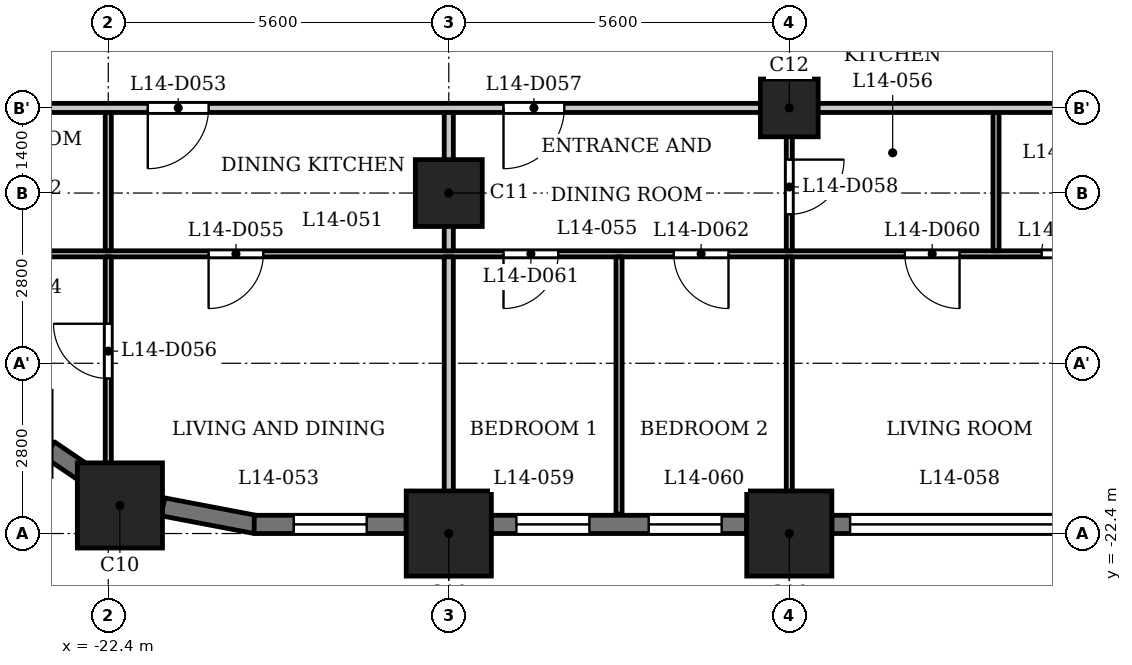
"""IFC4 building model, lengths in metres.
Left out: names, types, materials, properties, quantities, classifications, styles, units other than length and angle.
Written with IfcOpenShell. Run it as: python <this file> out.ifc"""

import sys

from ifc_helpers import new_model, si_unit, direction, frame, frame_2d, origin, origin_2d, place, context, subcontext, project, spatial, rectangle, extrude, element, fill, save


model = new_model("IFC4")
c1 = context("Model", 3, precision=1e-05, world=origin(), true_north=direction((0.0, 1.0)))
c2 = subcontext(c1, "Body", "Model", "MODEL_VIEW")
j1 = project(units=[si_unit("LENGTHUNIT", "METRE"), si_unit("PLANEANGLEUNIT", "RADIAN")], contexts=[c1])
p1 = place(None, origin())
s1 = spatial("IfcSite", under=j1, at=p1, CompositionType="ELEMENT")
p2 = place(p1, origin())
s2 = spatial("IfcBuilding", under=s1, at=p2, CompositionType="ELEMENT")
p3 = place(p2, frame((0.0, 0.0, 58.5)))
s3 = spatial("IfcBuildingStorey", under=s2, at=p3, CompositionType="ELEMENT", Elevation=58.5)
for number, where, z_axis, x_axis in (
    (1, (-22.209, -21.938, 0.0), (0.0, 0.0, 1.0), (1.0, 0.0, 0.0)),
    (2, (-16.8, -22.4, 0.0), (0.0, 0.0, 1.0), (1.0, 0.0, 0.0)),
    (3, (-11.2, -22.4, 0.0), (0.0, 0.0, 1.0), (1.0, 0.0, 0.0)),
):
    element("IfcColumn", number, at=place(p3, frame(where, z_axis=z_axis, x_axis=x_axis)), inside=s3, PredefinedType="COLUMN", context=c2, shape_type="SweptSolid", body=[
        extrude(rectangle(XDim=1.4, YDim=1.4, at=origin_2d()), origin(), (0.0, 0.0, 1.0), 3.5),
    ])
p4 = place(p3, frame((-16.8, -16.8, 0.0), z_axis=(0.0, 0.0, 1.0), x_axis=(1.0, 0.0, 0.0)))
e4 = element("IfcColumn", 4, at=p4, inside=s3, PredefinedType="COLUMN", context=c2, shape_type="SweptSolid", body=[
    extrude(rectangle(XDim=1.1, YDim=1.1, at=origin_2d()), origin(), (0.0, 0.0, 1.0), 3.5),
])
p5 = place(p3, frame((-11.2, -15.4, 0.0), z_axis=(0.0, 0.0, 1.0), x_axis=(1.0, 0.0, 0.0)))
e5 = element("IfcColumn", 5, at=p5, inside=s3, PredefinedType="COLUMN", context=c2, shape_type="SweptSolid", body=[
    extrude(rectangle(XDim=0.95, YDim=0.95, at=origin_2d()), origin(), (0.0, 0.0, 1.0), 3.5),
])
p6 = place(p3, frame((-23.368, -21.017, 0.0), z_axis=(0.0, 0.0, 1.0), x_axis=(0.827037530089, -0.562146710232, 0.0)))
e6 = element("IfcWall", 6, at=p6, inside=s3, PredefinedType="SOLIDWALL", context=c2, shape_type="SweptSolid", body=[
    extrude(rectangle(XDim=0.777, YDim=0.3, at=frame_2d((0.388, 0.0))), origin(), (0.0, 0.0, 1.0), 3.2),
])
p7 = place(p3, frame((-21.5, -21.961, 0.0), z_axis=(0.0, 0.0, 1.0), x_axis=(0.982297345734, -0.187328386968, 0.0)))
e7 = element("IfcWall", 7, at=p7, inside=s3, PredefinedType="SOLIDWALL", context=c2, shape_type="SweptSolid", body=[
    extrude(rectangle(XDim=1.556, YDim=0.3, at=frame_2d((0.778, 0.0))), origin(), (0.0, 0.0, 1.0), 2.35),
])
p8 = place(p3, frame((-20.0, -22.25, 0.0), z_axis=(0.0, 0.0, 1.0), x_axis=(1.0, 0.0, 0.0)))
e8 = element("IfcWall", 8, at=p8, inside=s3, PredefinedType="SOLIDWALL", context=c2, shape_type="SweptSolid", body=[
    extrude(rectangle(XDim=2.5, YDim=0.3, at=frame_2d((1.25, 0.0))), origin(), (0.0, 0.0, 1.0), 2.35),
])
p9 = place(p8, frame((0.65, 0.0, 0.6)))
e9 = element("IfcOpeningElement", 9, at=p9, cuts=e8, PredefinedType="OPENING", context=c2, shape_type="SweptSolid", body=[
    extrude(rectangle(XDim=1.2, YDim=1.55, at=frame_2d((0.6, 0.775))), frame((0.0, 0.16, 0.0), z_axis=(0.0, -1.0, 0.0), x_axis=(1.0, 0.0, 0.0)), (0.0, 0.0, 1.0), 0.32),
])
p10 = place(p3, frame((-16.1, -22.25, 0.0), z_axis=(0.0, 0.0, 1.0), x_axis=(1.0, 0.0, 0.0)))
e10 = element("IfcWall", 10, at=p10, inside=s3, PredefinedType="SOLIDWALL", context=c2, shape_type="SweptSolid", body=[
    extrude(rectangle(XDim=4.2, YDim=0.3, at=frame_2d((2.1, 0.0))), origin(), (0.0, 0.0, 1.0), 2.35),
])
p11 = place(p10, frame((0.413, 0.0, 0.6)))
e11 = element("IfcOpeningElement", 11, at=p11, cuts=e10, PredefinedType="OPENING", context=c2, shape_type="SweptSolid", body=[
    extrude(rectangle(XDim=1.2, YDim=1.55, at=frame_2d((0.6, 0.775))), frame((0.0, 0.16, 0.0), z_axis=(0.0, -1.0, 0.0), x_axis=(1.0, 0.0, 0.0)), (0.0, 0.0, 1.0), 0.32),
])
p12 = place(p10, frame((2.587, 0.0, 0.6)))
e12 = element("IfcOpeningElement", 12, at=p12, cuts=e10, PredefinedType="OPENING", context=c2, shape_type="SweptSolid", body=[
    extrude(rectangle(XDim=1.2, YDim=1.55, at=frame_2d((0.6, 0.775))), frame((0.0, 0.16, 0.0), z_axis=(0.0, -1.0, 0.0), x_axis=(1.0, 0.0, 0.0)), (0.0, 0.0, 1.0), 0.32),
])
p13 = place(p3, frame((-10.5, -22.25, 0.0), z_axis=(0.0, 0.0, 1.0), x_axis=(1.0, 0.0, 0.0)))
e13 = element("IfcWall", 13, at=p13, inside=s3, PredefinedType="SOLIDWALL", context=c2, shape_type="SweptSolid", body=[
    extrude(rectangle(XDim=4.2, YDim=0.3, at=frame_2d((2.1, 0.0))), origin(), (0.0, 0.0, 1.0), 2.35),
])
p14 = place(p13, frame((0.3, 0.0, 1.2)))
e14 = element("IfcOpeningElement", 14, at=p14, cuts=e13, PredefinedType="OPENING", context=c2, shape_type="SweptSolid", body=[
    extrude(rectangle(XDim=3.6, YDim=0.95, at=frame_2d((1.8, 0.475))), frame((0.0, 0.16, 0.0), z_axis=(0.0, -1.0, 0.0), x_axis=(1.0, 0.0, 0.0)), (0.0, 0.0, 1.0), 0.32),
])
p15 = place(p3, frame((-26.394, -17.8, 0.0), z_axis=(0.0, 0.0, 1.0), x_axis=(1.0, 0.0, 0.0)))
e15 = element("IfcWall", 15, at=p15, inside=s3, PredefinedType="PARTITIONING", context=c2, shape_type="SweptSolid", body=[
    extrude(rectangle(XDim=53.034, YDim=0.1, at=frame_2d((26.517, 0.0))), origin(), (0.0, 0.0, 1.0), 3.2),
])
p16 = place(p15, frame((0.794, 0.0, 0.0)))
e16 = element("IfcOpeningElement", 16, at=p16, cuts=e15, PredefinedType="OPENING", context=c2, shape_type="SweptSolid", body=[
    extrude(rectangle(XDim=0.8, YDim=2.1, at=frame_2d((0.4, 1.05))), frame((0.0, 0.06, 0.0), z_axis=(0.0, -1.0, 0.0), x_axis=(1.0, 0.0, 0.0)), (0.0, 0.0, 1.0), 0.12),
])
p17 = place(p15, frame((5.644, 0.0, 0.0)))
e17 = element("IfcOpeningElement", 17, at=p17, cuts=e15, PredefinedType="OPENING", context=c2, shape_type="SweptSolid", body=[
    extrude(rectangle(XDim=0.9, YDim=2.1, at=frame_2d((0.45, 1.05))), frame((0.0, 0.06, 0.0), z_axis=(0.0, -1.0, 0.0), x_axis=(1.0, 0.0, 0.0)), (0.0, 0.0, 1.0), 0.12),
])
p18 = place(p15, frame((19.344, 0.0, 0.0)))
e18 = element("IfcOpeningElement", 18, at=p18, cuts=e15, PredefinedType="OPENING", context=c2, shape_type="SweptSolid", body=[
    extrude(rectangle(XDim=0.8, YDim=2.1, at=frame_2d((0.4, 1.05))), frame((0.0, 0.06, 0.0), z_axis=(0.0, -1.0, 0.0), x_axis=(1.0, 0.0, 0.0)), (0.0, 0.0, 1.0), 0.12),
])
p19 = place(p15, frame((17.094, 0.0, 0.0)))
e19 = element("IfcOpeningElement", 19, at=p19, cuts=e15, PredefinedType="OPENING", context=c2, shape_type="SweptSolid", body=[
    extrude(rectangle(XDim=0.9, YDim=2.1, at=frame_2d((0.45, 1.05))), frame((0.0, 0.06, 0.0), z_axis=(0.0, -1.0, 0.0), x_axis=(1.0, 0.0, 0.0)), (0.0, 0.0, 1.0), 0.12),
])
p20 = place(p15, frame((10.494, 0.0, 0.0)))
e20 = element("IfcOpeningElement", 20, at=p20, cuts=e15, PredefinedType="OPENING", context=c2, shape_type="SweptSolid", body=[
    extrude(rectangle(XDim=0.9, YDim=2.1, at=frame_2d((0.45, 1.05))), frame((0.0, 0.06, 0.0), z_axis=(0.0, -1.0, 0.0), x_axis=(1.0, 0.0, 0.0)), (0.0, 0.0, 1.0), 0.12),
])
p21 = place(p15, frame((13.294, 0.0, 0.0)))
e21 = element("IfcOpeningElement", 21, at=p21, cuts=e15, PredefinedType="OPENING", context=c2, shape_type="SweptSolid", body=[
    extrude(rectangle(XDim=0.9, YDim=2.1, at=frame_2d((0.45, 1.05))), frame((0.0, 0.06, 0.0), z_axis=(0.0, -1.0, 0.0), x_axis=(1.0, 0.0, 0.0)), (0.0, 0.0, 1.0), 0.12),
])
p22 = place(p15, frame((27.044, 0.0, 0.0)))
e22 = element("IfcOpeningElement", 22, at=p22, cuts=e15, PredefinedType="OPENING", context=c2, shape_type="SweptSolid", body=[
    extrude(rectangle(XDim=0.8, YDim=2.1, at=frame_2d((0.4, 1.05))), frame((0.0, 0.06, 0.0), z_axis=(0.0, -1.0, 0.0), x_axis=(1.0, 0.0, 0.0)), (0.0, 0.0, 1.0), 0.12),
])
p23 = place(p15, frame((22.444, 0.0, 0.0)))
e23 = element("IfcOpeningElement", 23, at=p23, cuts=e15, PredefinedType="OPENING", context=c2, shape_type="SweptSolid", body=[
    extrude(rectangle(XDim=0.9, YDim=2.1, at=frame_2d((0.45, 1.05))), frame((0.0, 0.06, 0.0), z_axis=(0.0, -1.0, 0.0), x_axis=(1.0, 0.0, 0.0)), (0.0, 0.0, 1.0), 0.12),
])
p24 = place(p15, frame((36.144, 0.0, 0.0)))
e24 = element("IfcOpeningElement", 24, at=p24, cuts=e15, PredefinedType="OPENING", context=c2, shape_type="SweptSolid", body=[
    extrude(rectangle(XDim=0.8, YDim=2.1, at=frame_2d((0.4, 1.05))), frame((0.0, 0.06, 0.0), z_axis=(0.0, -1.0, 0.0), x_axis=(1.0, 0.0, 0.0)), (0.0, 0.0, 1.0), 0.12),
])
p25 = place(p15, frame((33.644, 0.0, 0.0)))
e25 = element("IfcOpeningElement", 25, at=p25, cuts=e15, PredefinedType="OPENING", context=c2, shape_type="SweptSolid", body=[
    extrude(rectangle(XDim=0.9, YDim=2.1, at=frame_2d((0.45, 1.05))), frame((0.0, 0.06, 0.0), z_axis=(0.0, -1.0, 0.0), x_axis=(1.0, 0.0, 0.0)), (0.0, 0.0, 1.0), 0.12),
])
p26 = place(p15, frame((39.144, 0.0, 0.0)))
e26 = element("IfcOpeningElement", 26, at=p26, cuts=e15, PredefinedType="OPENING", context=c2, shape_type="SweptSolid", body=[
    extrude(rectangle(XDim=0.8, YDim=2.1, at=frame_2d((0.4, 1.05))), frame((0.0, 0.06, 0.0), z_axis=(0.0, -1.0, 0.0), x_axis=(1.0, 0.0, 0.0)), (0.0, 0.0, 1.0), 0.12),
])
p27 = place(p15, frame((41.494, 0.0, 0.0)))
e27 = element("IfcOpeningElement", 27, at=p27, cuts=e15, PredefinedType="OPENING", context=c2, shape_type="SweptSolid", body=[
    extrude(rectangle(XDim=0.9, YDim=2.1, at=frame_2d((0.45, 1.05))), frame((0.0, 0.06, 0.0), z_axis=(0.0, -1.0, 0.0), x_axis=(1.0, 0.0, 0.0)), (0.0, 0.0, 1.0), 0.12),
])
p28 = place(p15, frame((49.362, 0.0, 0.0)))
e28 = element("IfcOpeningElement", 28, at=p28, cuts=e15, PredefinedType="OPENING", context=c2, shape_type="SweptSolid", body=[
    extrude(rectangle(XDim=0.8, YDim=2.1, at=frame_2d((0.4, 1.05))), frame((0.0, 0.06, 0.0), z_axis=(0.0, -1.0, 0.0), x_axis=(1.0, 0.0, 0.0)), (0.0, 0.0, 1.0), 0.12),
])
p29 = place(p15, frame((45.094, 0.0, 0.0)))
e29 = element("IfcOpeningElement", 29, at=p29, cuts=e15, PredefinedType="OPENING", context=c2, shape_type="SweptSolid", body=[
    extrude(rectangle(XDim=0.9, YDim=2.1, at=frame_2d((0.45, 1.05))), frame((0.0, 0.06, 0.0), z_axis=(0.0, -1.0, 0.0), x_axis=(1.0, 0.0, 0.0)), (0.0, 0.0, 1.0), 0.12),
])
p30 = place(p3, frame((-27.484, -15.4, 0.0), z_axis=(0.0, 0.0, 1.0), x_axis=(1.0, 0.0, 0.0)))
e30 = element("IfcWall", 30, at=p30, inside=s3, PredefinedType="PARTITIONING", context=c2, shape_type="SweptSolid", body=[
    extrude(rectangle(XDim=54.968, YDim=0.15, at=frame_2d((27.484, 0.0))), origin(), (0.0, 0.0, 1.0), 3.2),
])
p31 = place(p30, frame((5.734, 0.0, 0.0)))
e31 = element("IfcOpeningElement", 31, at=p31, cuts=e30, PredefinedType="OPENING", context=c2, shape_type="SweptSolid", body=[
    extrude(rectangle(XDim=1.0, YDim=2.1, at=frame_2d((0.5, 1.05))), frame((0.0, 0.085, 0.0), z_axis=(0.0, -1.0, 0.0), x_axis=(1.0, 0.0, 0.0)), (0.0, 0.0, 1.0), 0.17),
])
p32 = place(p30, frame((11.584, 0.0, 0.0)))
e32 = element("IfcOpeningElement", 32, at=p32, cuts=e30, PredefinedType="OPENING", context=c2, shape_type="SweptSolid", body=[
    extrude(rectangle(XDim=1.0, YDim=2.1, at=frame_2d((0.5, 1.05))), frame((0.0, 0.085, 0.0), z_axis=(0.0, -1.0, 0.0), x_axis=(1.0, 0.0, 0.0)), (0.0, 0.0, 1.0), 0.17),
])
p33 = place(p30, frame((22.534, 0.0, 0.0)))
e33 = element("IfcOpeningElement", 33, at=p33, cuts=e30, PredefinedType="OPENING", context=c2, shape_type="SweptSolid", body=[
    extrude(rectangle(XDim=1.0, YDim=2.1, at=frame_2d((0.5, 1.05))), frame((0.0, 0.085, 0.0), z_axis=(0.0, -1.0, 0.0), x_axis=(1.0, 0.0, 0.0)), (0.0, 0.0, 1.0), 0.17),
])
p34 = place(p30, frame((33.734, 0.0, 0.0)))
e34 = element("IfcOpeningElement", 34, at=p34, cuts=e30, PredefinedType="OPENING", context=c2, shape_type="SweptSolid", body=[
    extrude(rectangle(XDim=1.0, YDim=2.1, at=frame_2d((0.5, 1.05))), frame((0.0, 0.085, 0.0), z_axis=(0.0, -1.0, 0.0), x_axis=(1.0, 0.0, 0.0)), (0.0, 0.0, 1.0), 0.17),
])
p35 = place(p30, frame((42.334, 0.0, 0.0)))
e35 = element("IfcOpeningElement", 35, at=p35, cuts=e30, PredefinedType="OPENING", context=c2, shape_type="SweptSolid", body=[
    extrude(rectangle(XDim=1.0, YDim=2.1, at=frame_2d((0.5, 1.05))), frame((0.0, 0.085, 0.0), z_axis=(0.0, -1.0, 0.0), x_axis=(1.0, 0.0, 0.0)), (0.0, 0.0, 1.0), 0.17),
])
p36 = place(p30, frame((45.184, 0.0, 0.0)))
e36 = element("IfcOpeningElement", 36, at=p36, cuts=e30, PredefinedType="OPENING", context=c2, shape_type="SweptSolid", body=[
    extrude(rectangle(XDim=1.0, YDim=2.1, at=frame_2d((0.5, 1.05))), frame((0.0, 0.085, 0.0), z_axis=(0.0, -1.0, 0.0), x_axis=(1.0, 0.0, 0.0)), (0.0, 0.0, 1.0), 0.17),
])
p37 = place(p3, frame((-22.4, -21.72, 0.0), z_axis=(0.0, 0.0, 1.0), x_axis=(0.0, 1.0, 0.0)))
e37 = element("IfcWall", 37, at=p37, inside=s3, PredefinedType="PARTITIONING", context=c2, shape_type="SweptSolid", body=[
    extrude(rectangle(XDim=3.87, YDim=0.1, at=frame_2d((1.935, 0.0))), origin(), (0.0, 0.0, 1.0), 3.2),
])
p38 = place(p37, frame((1.87, 0.0, 0.0)))
e38 = element("IfcOpeningElement", 38, at=p38, cuts=e37, PredefinedType="OPENING", context=c2, shape_type="SweptSolid", body=[
    extrude(rectangle(XDim=0.9, YDim=2.1, at=frame_2d((0.45, 1.05))), frame((0.0, 0.06, 0.0), z_axis=(0.0, -1.0, 0.0), x_axis=(1.0, 0.0, 0.0)), (0.0, 0.0, 1.0), 0.12),
])
p39 = place(p3, frame((-22.4, -17.75, 0.0), z_axis=(0.0, 0.0, 1.0), x_axis=(0.0, 1.0, 0.0)))
e39 = element("IfcWall", 39, at=p39, inside=s3, PredefinedType="PARTITIONING", context=c2, shape_type="SweptSolid", body=[
    extrude(rectangle(XDim=2.275, YDim=0.1, at=frame_2d((1.137, 0.0))), origin(), (0.0, 0.0, 1.0), 3.2),
])
p40 = place(p3, frame((-16.8, -23.08, 0.0), z_axis=(0.0, 0.0, 1.0), x_axis=(0.0, 1.0, 0.0)))
e40 = element("IfcWall", 40, at=p40, inside=s3, PredefinedType="PARTITIONING", context=c2, shape_type="SweptSolid", body=[
    extrude(rectangle(XDim=5.23, YDim=0.15, at=frame_2d((2.615, 0.0))), origin(), (0.0, 0.0, 1.0), 3.2),
])
p41 = place(p3, frame((-16.8, -17.75, 0.0), z_axis=(0.0, 0.0, 1.0), x_axis=(0.0, 1.0, 0.0)))
e41 = element("IfcWall", 41, at=p41, inside=s3, PredefinedType="PARTITIONING", context=c2, shape_type="SweptSolid", body=[
    extrude(rectangle(XDim=2.275, YDim=0.15, at=frame_2d((1.137, 0.0))), origin(), (0.0, 0.0, 1.0), 3.2),
])
p42 = place(p3, frame((-14.0, -22.08, 0.0), z_axis=(0.0, 0.0, 1.0), x_axis=(0.0, 1.0, 0.0)))
e42 = element("IfcWall", 42, at=p42, inside=s3, PredefinedType="PARTITIONING", context=c2, shape_type="SweptSolid", body=[
    extrude(rectangle(XDim=4.23, YDim=0.1, at=frame_2d((2.115, 0.0))), origin(), (0.0, 0.0, 1.0), 3.2),
])
p43 = place(p3, frame((-11.2, -23.08, 0.0), z_axis=(0.0, 0.0, 1.0), x_axis=(0.0, 1.0, 0.0)))
e43 = element("IfcWall", 43, at=p43, inside=s3, PredefinedType="PARTITIONING", context=c2, shape_type="SweptSolid", body=[
    extrude(rectangle(XDim=5.23, YDim=0.1, at=frame_2d((2.615, 0.0))), origin(), (0.0, 0.0, 1.0), 3.2),
])
p44 = place(p3, frame((-11.2, -17.75, 0.0), z_axis=(0.0, 0.0, 1.0), x_axis=(0.0, 1.0, 0.0)))
e44 = element("IfcWall", 44, at=p44, inside=s3, PredefinedType="PARTITIONING", context=c2, shape_type="SweptSolid", body=[
    extrude(rectangle(XDim=2.275, YDim=0.1, at=frame_2d((1.137, 0.0))), origin(), (0.0, 0.0, 1.0), 3.2),
])
p45 = place(p44, frame((0.6, 0.0, 0.0)))
e45 = element("IfcOpeningElement", 45, at=p45, cuts=e44, PredefinedType="OPENING", context=c2, shape_type="SweptSolid", body=[
    extrude(rectangle(XDim=0.9, YDim=2.1, at=frame_2d((0.45, 1.05))), frame((0.0, 0.06, 0.0), z_axis=(0.0, -1.0, 0.0), x_axis=(1.0, 0.0, 0.0)), (0.0, 0.0, 1.0), 0.12),
])
p46 = place(p3, frame((-7.8, -17.75, 0.0), z_axis=(0.0, 0.0, 1.0), x_axis=(0.0, 1.0, 0.0)))
e46 = element("IfcWall", 46, at=p46, inside=s3, PredefinedType="PARTITIONING", context=c2, shape_type="SweptSolid", body=[
    extrude(rectangle(XDim=2.275, YDim=0.1, at=frame_2d((1.137, 0.0))), origin(), (0.0, 0.0, 1.0), 3.2),
])
p47 = place(p31, origin())
e47 = element("IfcDoor", 47, at=p47, inside=s3, OperationType="SINGLE_SWING_LEFT", PredefinedType="DOOR", context=c2, shape_type="SweptSolid", body=[
    extrude(rectangle(XDim=1.0, YDim=2.1, at=frame_2d((0.5, 1.05))), frame((0.0, 0.025, 0.0), z_axis=(0.0, -1.0, 0.0), x_axis=(1.0, 0.0, 0.0)), (0.0, 0.0, 1.0), 0.05),
])
fill(e31, e47)
p48 = place(p17, origin())
e48 = element("IfcDoor", 48, at=p48, inside=s3, OperationType="SINGLE_SWING_LEFT", PredefinedType="DOOR", context=c2, shape_type="SweptSolid", body=[
    extrude(rectangle(XDim=0.9, YDim=2.1, at=frame_2d((0.45, 1.05))), frame((0.0, 0.025, 0.0), z_axis=(0.0, -1.0, 0.0), x_axis=(1.0, 0.0, 0.0)), (0.0, 0.0, 1.0), 0.05),
])
fill(e17, e48)
p49 = place(p38, origin())
e49 = element("IfcDoor", 49, at=p49, inside=s3, OperationType="SINGLE_SWING_LEFT", PredefinedType="DOOR", context=c2, shape_type="SweptSolid", body=[
    extrude(rectangle(XDim=0.9, YDim=2.1, at=frame_2d((0.45, 1.05))), frame((0.0, 0.025, 0.0), z_axis=(0.0, -1.0, 0.0), x_axis=(1.0, 0.0, 0.0)), (0.0, 0.0, 1.0), 0.05),
])
fill(e38, e49)
p50 = place(p32, origin())
e50 = element("IfcDoor", 50, at=p50, inside=s3, OperationType="SINGLE_SWING_LEFT", PredefinedType="DOOR", context=c2, shape_type="SweptSolid", body=[
    extrude(rectangle(XDim=1.0, YDim=2.1, at=frame_2d((0.5, 1.05))), frame((0.0, 0.025, 0.0), z_axis=(0.0, -1.0, 0.0), x_axis=(1.0, 0.0, 0.0)), (0.0, 0.0, 1.0), 0.05),
])
fill(e32, e50)
p51 = place(p45, origin())
e51 = element("IfcDoor", 51, at=p51, inside=s3, OperationType="SINGLE_SWING_RIGHT", PredefinedType="DOOR", context=c2, shape_type="SweptSolid", body=[
    extrude(rectangle(XDim=0.9, YDim=2.1, at=frame_2d((0.45, 1.05))), frame((0.0, 0.025, 0.0), z_axis=(0.0, -1.0, 0.0), x_axis=(1.0, 0.0, 0.0)), (0.0, 0.0, 1.0), 0.05),
])
fill(e45, e51)
p52 = place(p18, origin())
e52 = element("IfcDoor", 52, at=p52, inside=s3, OperationType="SINGLE_SWING_LEFT", PredefinedType="DOOR", context=c2, shape_type="SweptSolid", body=[
    extrude(rectangle(XDim=0.8, YDim=2.1, at=frame_2d((0.4, 1.05))), frame((0.0, 0.025, 0.0), z_axis=(0.0, -1.0, 0.0), x_axis=(1.0, 0.0, 0.0)), (0.0, 0.0, 1.0), 0.05),
])
fill(e18, e52)
p53 = place(p19, origin())
e53 = element("IfcDoor", 53, at=p53, inside=s3, OperationType="SINGLE_SWING_RIGHT", PredefinedType="DOOR", context=c2, shape_type="SweptSolid", body=[
    extrude(rectangle(XDim=0.9, YDim=2.1, at=frame_2d((0.45, 1.05))), frame((0.0, 0.025, 0.0), z_axis=(0.0, -1.0, 0.0), x_axis=(1.0, 0.0, 0.0)), (0.0, 0.0, 1.0), 0.05),
])
fill(e19, e53)
p54 = place(p20, origin())
e54 = element("IfcDoor", 54, at=p54, inside=s3, OperationType="SINGLE_SWING_LEFT", PredefinedType="DOOR", context=c2, shape_type="SweptSolid", body=[
    extrude(rectangle(XDim=0.9, YDim=2.1, at=frame_2d((0.45, 1.05))), frame((0.0, 0.025, 0.0), z_axis=(0.0, -1.0, 0.0), x_axis=(1.0, 0.0, 0.0)), (0.0, 0.0, 1.0), 0.05),
])
fill(e20, e54)
p55 = place(p21, origin())
e55 = element("IfcDoor", 55, at=p55, inside=s3, OperationType="SINGLE_SWING_RIGHT", PredefinedType="DOOR", context=c2, shape_type="SweptSolid", body=[
    extrude(rectangle(XDim=0.9, YDim=2.1, at=frame_2d((0.45, 1.05))), frame((0.0, 0.025, 0.0), z_axis=(0.0, -1.0, 0.0), x_axis=(1.0, 0.0, 0.0)), (0.0, 0.0, 1.0), 0.05),
])
fill(e21, e55)
p56 = place(p9, origin())
e56 = element("IfcWindow", 56, at=p56, inside=s3, PartitioningType="SINGLE_PANEL", PredefinedType="WINDOW", context=c2, shape_type="SweptSolid", body=[
    extrude(rectangle(XDim=1.2, YDim=1.55, at=frame_2d((0.6, 0.775))), frame((0.0, 0.03, 0.0), z_axis=(0.0, -1.0, 0.0), x_axis=(1.0, 0.0, 0.0)), (0.0, 0.0, 1.0), 0.06),
])
fill(e9, e56)
p57 = place(p11, origin())
e57 = element("IfcWindow", 57, at=p57, inside=s3, PartitioningType="SINGLE_PANEL", PredefinedType="WINDOW", context=c2, shape_type="SweptSolid", body=[
    extrude(rectangle(XDim=1.2, YDim=1.55, at=frame_2d((0.6, 0.775))), frame((0.0, 0.03, 0.0), z_axis=(0.0, -1.0, 0.0), x_axis=(1.0, 0.0, 0.0)), (0.0, 0.0, 1.0), 0.06),
])
fill(e11, e57)
p58 = place(p12, origin())
e58 = element("IfcWindow", 58, at=p58, inside=s3, PartitioningType="SINGLE_PANEL", PredefinedType="WINDOW", context=c2, shape_type="SweptSolid", body=[
    extrude(rectangle(XDim=1.2, YDim=1.55, at=frame_2d((0.6, 0.775))), frame((0.0, 0.03, 0.0), z_axis=(0.0, -1.0, 0.0), x_axis=(1.0, 0.0, 0.0)), (0.0, 0.0, 1.0), 0.06),
])
fill(e12, e58)
p59 = place(p14, origin())
e59 = element("IfcWindow", 59, at=p59, inside=s3, PartitioningType="SINGLE_PANEL", PredefinedType="WINDOW", context=c2, shape_type="SweptSolid", body=[
    extrude(rectangle(XDim=3.6, YDim=0.95, at=frame_2d((1.8, 0.475))), frame((0.0, 0.03, 0.0), z_axis=(0.0, -1.0, 0.0), x_axis=(1.0, 0.0, 0.0)), (0.0, 0.0, 1.0), 0.06),
])
fill(e14, e59)
save(model, sys.argv[1])
